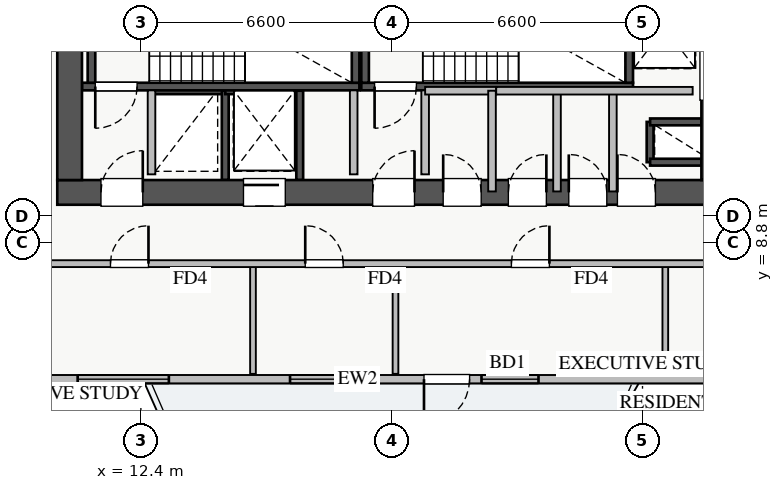
"""IFC4 building model, lengths in metres.
Left out: names, types, materials, properties, quantities, classifications, styles, units other than length and angle.
Written with IfcOpenShell. Run it as: python <this file> out.ifc"""

import sys

from ifc_helpers import new_model, si_unit, direction, frame, frame_2d, origin, place, context, subcontext, project, spatial, rectangle, extrude, source, transform, mapped, element, fill, save


model = new_model("IFC4")
c1 = context("Model", 3, precision=1e-05, world=origin(), true_north=direction((0.0, 1.0)))
c2 = subcontext(c1, "Body", "Model", "MODEL_VIEW")
j1 = project(units=[si_unit("LENGTHUNIT", "METRE"), si_unit("PLANEANGLEUNIT", "RADIAN")], contexts=[c1])
p1 = place(None, origin())
s1 = spatial("IfcSite", under=j1, at=p1, CompositionType="ELEMENT")
p2 = place(p1, origin())
s2 = spatial("IfcBuilding", under=s1, at=p2, CompositionType="ELEMENT")
p3 = place(p2, frame((0.0, 0.0, 113.25)))
s3 = spatial("IfcBuildingStorey", under=s2, at=p3, CompositionType="ELEMENT", Elevation=113.25)
p4 = place(p3, frame((12.68, 12.8, 0.0), z_axis=(0.0, 0.0, 1.0), x_axis=(1.0, 0.0, 0.0)))
e1 = element("IfcWall", 1, at=p4, inside=s3, PredefinedType="SHEAR", context=c2, shape_type="SweptSolid", body=[
    extrude(rectangle(XDim=1.94, YDim=0.18, at=frame_2d((0.97, 0.0))), origin(), (0.0, 0.0, 1.0), 3.07),
])
p5 = place(p3, frame((14.62, 10.45, 0.0), z_axis=(0.0, 0.0, 1.0), x_axis=(0.0, 1.0, 0.0)))
e2 = element("IfcWall", 2, at=p5, inside=s3, PredefinedType="SHEAR", context=c2, shape_type="SweptSolid", body=[
    extrude(rectangle(XDim=2.35, YDim=0.18, at=frame_2d((1.175, 0.0))), origin(), (0.0, 0.0, 1.0), 3.07),
])
p6 = place(p3, frame((25.8, 10.92, 0.0), z_axis=(0.0, 0.0, 1.0), x_axis=(0.0, 1.0, 0.0)))
e3 = element("IfcWall", 3, at=p6, inside=s3, PredefinedType="SHEAR", context=c2, shape_type="SweptSolid", body=[
    extrude(rectangle(XDim=1.06, YDim=0.18, at=frame_2d((0.53, 0.0))), origin(), (0.0, 0.0, 1.0), 3.07),
])
for number, where, z_axis, x_axis in (
    (4, (25.8, 11.98, 0.0), (0.0, 0.0, 1.0), (1.0, 0.0, 0.0)),
    (5, (25.8, 10.92, 0.0), (0.0, 0.0, 1.0), (1.0, 0.0, 0.0)),
):
    element("IfcWall", number, at=place(p3, frame(where, z_axis=z_axis, x_axis=x_axis)), inside=s3, PredefinedType="SHEAR", context=c2, shape_type="SweptSolid", body=[
        extrude(rectangle(XDim=1.35, YDim=0.18, at=frame_2d((0.675, 0.0))), origin(), (0.0, 0.0, 1.0), 3.07),
    ])
p7 = place(p3, frame((14.62, 12.8, 0.0), z_axis=(0.0, 0.0, 1.0), x_axis=(1.0, 0.0, 0.0)))
e6 = element("IfcWall", 6, at=p7, inside=s3, PredefinedType="SHEAR", context=c2, shape_type="SweptSolid", body=[
    extrude(rectangle(XDim=1.96, YDim=0.18, at=frame_2d((0.98, 0.0))), origin(), (0.0, 0.0, 1.0), 3.07),
])
p8 = place(p3, frame((16.58, 10.45, 0.0), z_axis=(0.0, 0.0, 1.0), x_axis=(0.0, 1.0, 0.0)))
e7 = element("IfcWall", 7, at=p8, inside=s3, PredefinedType="SHEAR", context=c2, shape_type="SweptSolid", body=[
    extrude(rectangle(XDim=2.35, YDim=0.18, at=frame_2d((1.175, 0.0))), origin(), (0.0, 0.0, 1.0), 3.07),
])
p9 = place(p3, frame((10.85, 12.91, 0.0), z_axis=(0.0, 0.0, 1.0), x_axis=(1.0, 0.0, 0.0)))
e8 = element("IfcWall", 8, at=p9, inside=s3, PredefinedType="SHEAR", context=c2, shape_type="SweptSolid", body=[
    extrude(rectangle(XDim=7.3, YDim=0.2, at=frame_2d((3.65, 0.0))), origin(), (0.0, 0.0, 1.0), 3.25),
])
p10 = place(p9, frame((0.35, 0.0, 0.0)))
e9 = element("IfcOpeningElement", 9, at=p10, cuts=e8, PredefinedType="OPENING", context=c2, shape_type="SweptSolid", body=[
    extrude(rectangle(XDim=1.1, YDim=2.05, at=frame_2d((0.55, 1.025))), frame((0.0, 0.11, 0.0), z_axis=(0.0, -1.0, 0.0), x_axis=(1.0, 0.0, 0.0)), (0.0, 0.0, 1.0), 0.22),
])
for number, where, z_axis, x_axis in (
    (10, (11.1, 13.01, 0.0), (0.0, 0.0, 1.0), (0.0, 1.0, 0.0)),
    (11, (18.05, 13.01, 0.0), (0.0, 0.0, 1.0), (0.0, 1.0, 0.0)),
):
    element("IfcWall", number, at=place(p3, frame(where, z_axis=z_axis, x_axis=x_axis)), inside=s3, PredefinedType="SHEAR", context=c2, shape_type="SweptSolid", body=[
        extrude(rectangle(XDim=2.94, YDim=0.2, at=frame_2d((1.47, 0.0))), origin(), (0.0, 0.0, 1.0), 3.25),
    ])
p11 = place(p3, frame((18.2, 12.91, 0.0), z_axis=(0.0, 0.0, 1.0), x_axis=(1.0, 0.0, 0.0)))
e12 = element("IfcWall", 12, at=p11, inside=s3, PredefinedType="SHEAR", context=c2, shape_type="SweptSolid", body=[
    extrude(rectangle(XDim=7.15, YDim=0.2, at=frame_2d((3.575, 0.0))), origin(), (0.0, 0.0, 1.0), 3.25),
])
p12 = place(p11, frame((0.35, 0.0, 0.0)))
e13 = element("IfcOpeningElement", 13, at=p12, cuts=e12, PredefinedType="OPENING", context=c2, shape_type="SweptSolid", body=[
    extrude(rectangle(XDim=1.1, YDim=2.05, at=frame_2d((0.55, 1.025))), frame((0.0, 0.11, 0.0), z_axis=(0.0, -1.0, 0.0), x_axis=(1.0, 0.0, 0.0)), (0.0, 0.0, 1.0), 0.22),
])
for number, where, z_axis, x_axis in (
    (14, (18.3, 13.01, 0.0), (0.0, 0.0, 1.0), (0.0, 1.0, 0.0)),
    (15, (25.25, 13.01, 0.0), (0.0, 0.0, 1.0), (0.0, 1.0, 0.0)),
):
    element("IfcWall", number, at=place(p3, frame(where, z_axis=z_axis, x_axis=x_axis)), inside=s3, PredefinedType="SHEAR", context=c2, shape_type="SweptSolid", body=[
        extrude(rectangle(XDim=2.94, YDim=0.2, at=frame_2d((1.47, 0.0))), origin(), (0.0, 0.0, 1.0), 3.25),
    ])
p13 = place(p3, frame((10.2, 10.125, 0.0), z_axis=(0.0, 0.0, 1.0), x_axis=(1.0, 0.0, 0.0)))
e16 = element("IfcWall", 16, at=p13, inside=s3, PredefinedType="SHEAR", context=c2, shape_type="SweptSolid", body=[
    extrude(rectangle(XDim=17.6, YDim=0.65, at=frame_2d((8.8, 0.0))), origin(), (0.0, 0.0, 1.0), 3.25),
])
p14 = place(p13, frame((1.15, 0.0, 0.0)))
e17 = element("IfcOpeningElement", 17, at=p14, cuts=e16, PredefinedType="OPENING", context=c2, shape_type="SweptSolid", body=[
    extrude(rectangle(XDim=1.1, YDim=2.05, at=frame_2d((0.55, 1.025))), frame((0.0, 0.335, 0.0), z_axis=(0.0, -1.0, 0.0), x_axis=(1.0, 0.0, 0.0)), (0.0, 0.0, 1.0), 0.67),
])
p15 = place(p13, frame((8.3, 0.0, 0.0)))
e18 = element("IfcOpeningElement", 18, at=p15, cuts=e16, PredefinedType="OPENING", context=c2, shape_type="SweptSolid", body=[
    extrude(rectangle(XDim=1.1, YDim=2.05, at=frame_2d((0.55, 1.025))), frame((0.0, 0.335, 0.0), z_axis=(0.0, -1.0, 0.0), x_axis=(1.0, 0.0, 0.0)), (0.0, 0.0, 1.0), 0.67),
])
p16 = place(p13, frame((4.9, 0.0, 0.0)))
e19 = element("IfcOpeningElement", 19, at=p16, cuts=e16, PredefinedType="OPENING", context=c2, shape_type="SweptSolid", body=[
    extrude(rectangle(XDim=1.1, YDim=2.05, at=frame_2d((0.55, 1.025))), frame((0.0, 0.335, 0.0), z_axis=(0.0, -1.0, 0.0), x_axis=(1.0, 0.0, 0.0)), (0.0, 0.0, 1.0), 0.67),
])
p17 = place(p13, frame((14.74, 0.0, 0.0)))
e20 = element("IfcOpeningElement", 20, at=p17, cuts=e16, PredefinedType="OPENING", context=c2, shape_type="SweptSolid", body=[
    extrude(rectangle(XDim=1.0, YDim=2.05, at=frame_2d((0.5, 1.025))), frame((0.0, 0.335, 0.0), z_axis=(0.0, -1.0, 0.0), x_axis=(1.0, 0.0, 0.0)), (0.0, 0.0, 1.0), 0.67),
])
p18 = place(p13, frame((10.155, 0.0, 0.0)))
e21 = element("IfcOpeningElement", 21, at=p18, cuts=e16, PredefinedType="OPENING", context=c2, shape_type="SweptSolid", body=[
    extrude(rectangle(XDim=1.0, YDim=2.05, at=frame_2d((0.5, 1.025))), frame((0.0, 0.335, 0.0), z_axis=(0.0, -1.0, 0.0), x_axis=(1.0, 0.0, 0.0)), (0.0, 0.0, 1.0), 0.67),
])
p19 = place(p13, frame((11.87, 0.0, 0.0)))
e22 = element("IfcOpeningElement", 22, at=p19, cuts=e16, PredefinedType="OPENING", context=c2, shape_type="SweptSolid", body=[
    extrude(rectangle(XDim=1.0, YDim=2.05, at=frame_2d((0.5, 1.025))), frame((0.0, 0.335, 0.0), z_axis=(0.0, -1.0, 0.0), x_axis=(1.0, 0.0, 0.0)), (0.0, 0.0, 1.0), 0.67),
])
p20 = place(p13, frame((13.46, 0.0, 0.0)))
e23 = element("IfcOpeningElement", 23, at=p20, cuts=e16, PredefinedType="OPENING", context=c2, shape_type="SweptSolid", body=[
    extrude(rectangle(XDim=1.0, YDim=2.05, at=frame_2d((0.5, 1.025))), frame((0.0, 0.335, 0.0), z_axis=(0.0, -1.0, 0.0), x_axis=(1.0, 0.0, 0.0)), (0.0, 0.0, 1.0), 0.67),
])
p21 = place(p3, frame((10.525, 10.45, 0.0), z_axis=(0.0, 0.0, 1.0), x_axis=(0.0, 1.0, 0.0)))
e24 = element("IfcWall", 24, at=p21, inside=s3, PredefinedType="SHEAR", context=c2, shape_type="SweptSolid", body=[
    extrude(rectangle(XDim=5.9, YDim=0.65, at=frame_2d((2.95, 0.0))), origin(), (0.0, 0.0, 1.0), 3.25),
])
p22 = place(p3, frame((27.475, 10.45, 0.0), z_axis=(0.0, 0.0, 1.0), x_axis=(0.0, 1.0, 0.0)))
e25 = element("IfcWall", 25, at=p22, inside=s3, PredefinedType="SHEAR", context=c2, shape_type="SweptSolid", body=[
    extrude(rectangle(XDim=5.9, YDim=0.65, at=frame_2d((2.95, 0.0))), origin(), (0.0, 0.0, 1.0), 3.25),
])
p23 = place(p22, frame((2.1, 0.0, 0.0)))
e26 = element("IfcOpeningElement", 26, at=p23, cuts=e25, PredefinedType="OPENING", context=c2, shape_type="SweptSolid", body=[
    extrude(rectangle(XDim=1.3, YDim=2.05, at=frame_2d((0.65, 1.025))), frame((0.0, 0.335, 0.0), z_axis=(0.0, -1.0, 0.0), x_axis=(1.0, 0.0, 0.0)), (0.0, 0.0, 1.0), 0.67),
])
p24 = place(p3, frame((6.55, 5.21, 0.0), z_axis=(0.0, 0.0, 1.0), x_axis=(1.0, 0.0, 0.0)))
e27 = element("IfcWall", 27, at=p24, inside=s3, PredefinedType="STANDARD", context=c2, shape_type="SweptSolid", body=[
    extrude(rectangle(XDim=24.9, YDim=0.22, at=frame_2d((12.45, 0.0))), origin(), (0.0, 0.0, 1.0), 2.61),
])
p25 = place(p24, frame((13.3, 0.0, 0.0)))
e28 = element("IfcOpeningElement", 28, at=p25, cuts=e27, PredefinedType="OPENING", context=c2, shape_type="SweptSolid", body=[
    extrude(rectangle(XDim=1.2, YDim=2.1, at=frame_2d((0.6, 1.05))), frame((0.0, 0.12, 0.0), z_axis=(0.0, -1.0, 0.0), x_axis=(1.0, 0.0, 0.0)), (0.0, 0.0, 1.0), 0.24),
])
p26 = place(p24, frame((0.258, 0.0, 0.9)))
e29 = element("IfcOpeningElement", 29, at=p26, cuts=e27, PredefinedType="OPENING", context=c2, shape_type="SweptSolid", body=[
    extrude(rectangle(XDim=1.8, YDim=1.5, at=frame_2d((0.9, 0.75))), frame((0.0, 0.12, 0.0), z_axis=(0.0, -1.0, 0.0), x_axis=(1.0, 0.0, 0.0)), (0.0, 0.0, 1.0), 0.24),
])
p27 = place(p24, frame((9.775, 0.0, 0.9)))
e30 = element("IfcOpeningElement", 30, at=p27, cuts=e27, PredefinedType="OPENING", context=c2, shape_type="SweptSolid", body=[
    extrude(rectangle(XDim=1.8, YDim=1.5, at=frame_2d((0.9, 0.75))), frame((0.0, 0.12, 0.0), z_axis=(0.0, -1.0, 0.0), x_axis=(1.0, 0.0, 0.0)), (0.0, 0.0, 1.0), 0.24),
])
p28 = place(p24, frame((14.813, 0.0, 0.9)))
e31 = element("IfcOpeningElement", 31, at=p28, cuts=e27, PredefinedType="OPENING", context=c2, shape_type="SweptSolid", body=[
    extrude(rectangle(XDim=1.5, YDim=1.45, at=frame_2d((0.75, 0.725))), frame((0.0, 0.12, 0.0), z_axis=(0.0, -1.0, 0.0), x_axis=(1.0, 0.0, 0.0)), (0.0, 0.0, 1.0), 0.24),
])
p29 = place(p24, frame((20.738, 0.0, 0.9)))
e32 = element("IfcOpeningElement", 32, at=p29, cuts=e27, PredefinedType="OPENING", context=c2, shape_type="SweptSolid", body=[
    extrude(rectangle(XDim=2.1, YDim=1.48, at=frame_2d((1.05, 0.74))), frame((0.0, 0.12, 0.0), z_axis=(0.0, -1.0, 0.0), x_axis=(1.0, 0.0, 0.0)), (0.0, 0.0, 1.0), 0.24),
])
p30 = place(p24, frame((4.187, 0.0, 0.9)))
e33 = element("IfcOpeningElement", 33, at=p30, cuts=e27, PredefinedType="OPENING", context=c2, shape_type="SweptSolid", body=[
    extrude(rectangle(XDim=2.4, YDim=1.5, at=frame_2d((1.2, 0.75))), frame((0.0, 0.12, 0.0), z_axis=(0.0, -1.0, 0.0), x_axis=(1.0, 0.0, 0.0)), (0.0, 0.0, 1.0), 0.24),
])
for number, where, z_axis, x_axis in (
    (34, (12.68, 10.6, 0.0), (0.0, 0.0, 1.0), (0.0, 1.0, 0.0)),
    (35, (18.0, 10.6, 0.0), (0.0, 0.0, 1.0), (0.0, 1.0, 0.0)),
    (36, (19.88, 10.6, 0.0), (0.0, 0.0, 1.0), (0.0, 1.0, 0.0)),
):
    element("IfcWall", number, at=place(p3, frame(where, z_axis=z_axis, x_axis=x_axis)), inside=s3, PredefinedType="PARTITIONING", context=c2, shape_type="SweptSolid", body=[
        extrude(rectangle(XDim=2.21, YDim=0.2, at=frame_2d((1.105, 0.0))), origin(), (0.0, 0.0, 1.0), 3.07),
    ])
p31 = place(p3, frame((24.82, 10.15, 0.0), z_axis=(0.0, 0.0, 1.0), x_axis=(0.0, 1.0, 0.0)))
e37 = element("IfcWall", 37, at=p31, inside=s3, PredefinedType="PARTITIONING", context=c2, shape_type="SweptSolid", body=[
    extrude(rectangle(XDim=2.65, YDim=0.2, at=frame_2d((1.325, 0.0))), origin(), (0.0, 0.0, 1.0), 3.07),
])
p32 = place(p3, frame((19.88, 12.8, 0.0), z_axis=(0.0, 0.0, 1.0), x_axis=(1.0, 0.0, 0.0)))
e38 = element("IfcWall", 38, at=p32, inside=s3, PredefinedType="PARTITIONING", context=c2, shape_type="SweptSolid", body=[
    extrude(rectangle(XDim=1.87, YDim=0.2, at=frame_2d((0.935, 0.0))), origin(), (0.0, 0.0, 1.0), 3.07),
])
for number, where, z_axis, x_axis in (
    (39, (21.64, 10.15, 0.0), (0.0, 0.0, 1.0), (0.0, 1.0, 0.0)),
    (40, (23.35, 10.15, 0.0), (0.0, 0.0, 1.0), (0.0, 1.0, 0.0)),
):
    element("IfcWall", number, at=place(p3, frame(where, z_axis=z_axis, x_axis=x_axis)), inside=s3, PredefinedType="PARTITIONING", context=c2, shape_type="SweptSolid", body=[
        extrude(rectangle(XDim=2.65, YDim=0.2, at=frame_2d((1.325, 0.0))), origin(), (0.0, 0.0, 1.0), 3.07),
    ])
p33 = place(p3, frame((21.75, 12.8, 0.0), z_axis=(0.0, 0.0, 1.0), x_axis=(1.0, 0.0, 0.0)))
e41 = element("IfcWall", 41, at=p33, inside=s3, PredefinedType="PARTITIONING", context=c2, shape_type="SweptSolid", body=[
    extrude(rectangle(XDim=5.17, YDim=0.2, at=frame_2d((2.585, 0.0))), origin(), (0.0, 0.0, 1.0), 3.07),
])
p34 = place(p3, frame((15.35, 5.35, 0.0), z_axis=(0.0, 0.0, 1.0), x_axis=(0.0, 1.0, 0.0)))
e42 = element("IfcWall", 42, at=p34, inside=s3, PredefinedType="PARTITIONING", context=c2, shape_type="SweptSolid", body=[
    extrude(rectangle(XDim=2.9, YDim=0.15, at=frame_2d((1.45, 0.0))), origin(), (0.0, 0.0, 1.0), 3.07),
])
p35 = place(p3, frame((19.1, 5.35, 0.0), z_axis=(0.0, 0.0, 1.0), x_axis=(0.0, 1.0, 0.0)))
e43 = element("IfcWall", 43, at=p35, inside=s3, PredefinedType="PARTITIONING", context=c2, shape_type="SweptSolid", body=[
    extrude(rectangle(XDim=2.9, YDim=0.15, at=frame_2d((1.45, 0.0))), origin(), (0.0, 0.0, 1.0), 2.771),
])
p36 = place(p3, frame((26.2, 5.35, 0.0), z_axis=(0.0, 0.0, 1.0), x_axis=(0.0, 1.0, 0.0)))
e44 = element("IfcWall", 44, at=p36, inside=s3, PredefinedType="PARTITIONING", context=c2, shape_type="SweptSolid", body=[
    extrude(rectangle(XDim=2.9, YDim=0.15, at=frame_2d((1.45, 0.0))), origin(), (0.0, 0.0, 1.0), 3.07),
])
p37 = place(p3, frame((8.85, 8.25, 0.0), z_axis=(0.0, 0.0, 1.0), x_axis=(1.0, 0.0, 0.0)))
e45 = element("IfcWall", 45, at=p37, inside=s3, PredefinedType="PARTITIONING", context=c2, shape_type="SweptSolid", body=[
    extrude(rectangle(XDim=23.57, YDim=0.18, at=frame_2d((11.785, 0.0))), origin(), (0.0, 0.0, 1.0), 3.07),
])
p38 = place(p37, frame((2.75, 0.0, 0.0)))
e46 = element("IfcOpeningElement", 46, at=p38, cuts=e45, PredefinedType="OPENING", context=c2, shape_type="SweptSolid", body=[
    extrude(rectangle(XDim=1.0, YDim=2.05, at=frame_2d((0.5, 1.025))), frame((0.0, 0.1, 0.0), z_axis=(0.0, -1.0, 0.0), x_axis=(1.0, 0.0, 0.0)), (0.0, 0.0, 1.0), 0.2),
])
p39 = place(p37, frame((7.875, 0.0, 0.0)))
e47 = element("IfcOpeningElement", 47, at=p39, cuts=e45, PredefinedType="OPENING", context=c2, shape_type="SweptSolid", body=[
    extrude(rectangle(XDim=1.0, YDim=2.05, at=frame_2d((0.5, 1.025))), frame((0.0, 0.1, 0.0), z_axis=(0.0, -1.0, 0.0), x_axis=(1.0, 0.0, 0.0)), (0.0, 0.0, 1.0), 0.2),
])
p40 = place(p37, frame((13.3, 0.0, 0.0)))
e48 = element("IfcOpeningElement", 48, at=p40, cuts=e45, PredefinedType="OPENING", context=c2, shape_type="SweptSolid", body=[
    extrude(rectangle(XDim=1.0, YDim=2.05, at=frame_2d((0.5, 1.025))), frame((0.0, 0.1, 0.0), z_axis=(0.0, -1.0, 0.0), x_axis=(1.0, 0.0, 0.0)), (0.0, 0.0, 1.0), 0.2),
])
p41 = place(p37, frame((19.74, 0.0, 0.0)))
e49 = element("IfcOpeningElement", 49, at=p41, cuts=e45, PredefinedType="OPENING", context=c2, shape_type="SweptSolid", body=[
    extrude(rectangle(XDim=1.0, YDim=2.05, at=frame_2d((0.5, 1.025))), frame((0.0, 0.1, 0.0), z_axis=(0.0, -1.0, 0.0), x_axis=(1.0, 0.0, 0.0)), (0.0, 0.0, 1.0), 0.2),
])
m1 = source(origin(), c2, "Body", "SweptSolid", [
    extrude(rectangle(XDim=1.2, YDim=2.1, at=frame_2d((0.6, 1.05))), frame((0.0, 0.025, 0.0), z_axis=(0.0, -1.0, 0.0), x_axis=(1.0, 0.0, 0.0)), (0.0, 0.0, 1.0), 0.05),
])
p42 = place(p25, frame((1.2, 0.0, 0.0), z_axis=(0.0, 0.0, 1.0), x_axis=(-1.0, 0.0, 0.0)))
e50 = element("IfcDoor", 50, at=p42, inside=s3, OperationType="SINGLE_SWING_LEFT", PredefinedType="DOOR", context=c2, shape_type="MappedRepresentation", body=[
    mapped(m1, transform((0.0, 0.0, 0.0), x_axis=(1.0, 0.0, 0.0), y_axis=(0.0, 1.0, 0.0), z_axis=(0.0, 0.0, 1.0), scale=1.0)),
])
fill(e28, e50)
m2 = source(origin(), c2, "Body", "SweptSolid", [
    extrude(rectangle(XDim=1.8, YDim=1.5, at=frame_2d((0.9, 0.75))), frame((0.0, 0.03, 0.0), z_axis=(0.0, -1.0, 0.0), x_axis=(1.0, 0.0, 0.0)), (0.0, 0.0, 1.0), 0.06),
])
p43 = place(p27, origin())
e51 = element("IfcWindow", 51, at=p43, inside=s3, PartitioningType="DOUBLE_PANEL_VERTICAL", PredefinedType="WINDOW", context=c2, shape_type="MappedRepresentation", body=[
    mapped(m2, transform((0.0, 0.0, 0.0), x_axis=(1.0, 0.0, 0.0), y_axis=(0.0, 1.0, 0.0), z_axis=(0.0, 0.0, 1.0), scale=1.0)),
])
fill(e30, e51)
m3 = source(origin(), c2, "Body", "SweptSolid", [
    extrude(rectangle(XDim=1.5, YDim=1.45, at=frame_2d((0.75, 0.725))), frame((0.0, 0.03, 0.0), z_axis=(0.0, -1.0, 0.0), x_axis=(1.0, 0.0, 0.0)), (0.0, 0.0, 1.0), 0.06),
])
p44 = place(p28, origin())
e52 = element("IfcWindow", 52, at=p44, inside=s3, PartitioningType="DOUBLE_PANEL_VERTICAL", PredefinedType="WINDOW", context=c2, shape_type="MappedRepresentation", body=[
    mapped(m3, transform((0.0, 0.0, 0.0), x_axis=(1.0, 0.0, 0.0), y_axis=(0.0, 1.0, 0.0), z_axis=(0.0, 0.0, 1.0), scale=1.0)),
])
fill(e31, e52)
m4 = source(origin(), c2, "Body", "SweptSolid", [
    extrude(rectangle(XDim=1.1, YDim=2.05, at=frame_2d((0.55, 1.025))), frame((0.0, 0.025, 0.0), z_axis=(0.0, -1.0, 0.0), x_axis=(1.0, 0.0, 0.0)), (0.0, 0.0, 1.0), 0.05),
])
p45 = place(p14, origin())
e53 = element("IfcDoor", 53, at=p45, inside=s3, OperationType="SINGLE_SWING_RIGHT", PredefinedType="DOOR", context=c2, shape_type="MappedRepresentation", body=[
    mapped(m4, transform((0.0, 0.0, 0.0), x_axis=(1.0, 0.0, 0.0), y_axis=(0.0, 1.0, 0.0), z_axis=(0.0, 0.0, 1.0), scale=1.0)),
])
fill(e17, e53)
p46 = place(p10, frame((1.1, 0.0, 0.0), z_axis=(0.0, 0.0, 1.0), x_axis=(-1.0, 0.0, 0.0)))
e54 = element("IfcDoor", 54, at=p46, inside=s3, OperationType="SINGLE_SWING_LEFT", PredefinedType="DOOR", context=c2, shape_type="MappedRepresentation", body=[
    mapped(m4, transform((0.0, 0.0, 0.0), x_axis=(1.0, 0.0, 0.0), y_axis=(0.0, 1.0, 0.0), z_axis=(0.0, 0.0, 1.0), scale=1.0)),
])
fill(e9, e54)
p47 = place(p15, origin())
e55 = element("IfcDoor", 55, at=p47, inside=s3, OperationType="SINGLE_SWING_RIGHT", PredefinedType="DOOR", context=c2, shape_type="MappedRepresentation", body=[
    mapped(m4, transform((0.0, 0.0, 0.0), x_axis=(1.0, 0.0, 0.0), y_axis=(0.0, 1.0, 0.0), z_axis=(0.0, 0.0, 1.0), scale=1.0)),
])
fill(e18, e55)
p48 = place(p12, frame((1.1, 0.0, 0.0), z_axis=(0.0, 0.0, 1.0), x_axis=(-1.0, 0.0, 0.0)))
e56 = element("IfcDoor", 56, at=p48, inside=s3, OperationType="SINGLE_SWING_LEFT", PredefinedType="DOOR", context=c2, shape_type="MappedRepresentation", body=[
    mapped(m4, transform((0.0, 0.0, 0.0), x_axis=(1.0, 0.0, 0.0), y_axis=(0.0, 1.0, 0.0), z_axis=(0.0, 0.0, 1.0), scale=1.0)),
])
fill(e13, e56)
p49 = place(p16, origin())
e57 = element("IfcDoor", 57, at=p49, inside=s3, OperationType="SLIDING_TO_RIGHT", PredefinedType="DOOR", context=c2, shape_type="MappedRepresentation", body=[
    mapped(m4, transform((0.0, 0.0, 0.0), x_axis=(1.0, 0.0, 0.0), y_axis=(0.0, 1.0, 0.0), z_axis=(0.0, 0.0, 1.0), scale=1.0)),
])
fill(e19, e57)
m5 = source(origin(), c2, "Body", "SweptSolid", [
    extrude(rectangle(XDim=1.0, YDim=2.05, at=frame_2d((0.5, 1.025))), frame((0.0, 0.025, 0.0), z_axis=(0.0, -1.0, 0.0), x_axis=(1.0, 0.0, 0.0)), (0.0, 0.0, 1.0), 0.05),
])
p50 = place(p17, origin())
e58 = element("IfcDoor", 58, at=p50, inside=s3, OperationType="SINGLE_SWING_LEFT", PredefinedType="DOOR", context=c2, shape_type="MappedRepresentation", body=[
    mapped(m5, transform((0.0, 0.0, 0.0), x_axis=(1.0, 0.0, 0.0), y_axis=(0.0, 1.0, 0.0), z_axis=(0.0, 0.0, 1.0), scale=1.0)),
])
fill(e20, e58)
p51 = place(p18, origin())
e59 = element("IfcDoor", 59, at=p51, inside=s3, OperationType="SINGLE_SWING_LEFT", PredefinedType="DOOR", context=c2, shape_type="MappedRepresentation", body=[
    mapped(m5, transform((0.0, 0.0, 0.0), x_axis=(1.0, 0.0, 0.0), y_axis=(0.0, 1.0, 0.0), z_axis=(0.0, 0.0, 1.0), scale=1.0)),
])
fill(e21, e59)
p52 = place(p19, origin())
e60 = element("IfcDoor", 60, at=p52, inside=s3, OperationType="SINGLE_SWING_RIGHT", PredefinedType="DOOR", context=c2, shape_type="MappedRepresentation", body=[
    mapped(m5, transform((0.0, 0.0, 0.0), x_axis=(1.0, 0.0, 0.0), y_axis=(0.0, 1.0, 0.0), z_axis=(0.0, 0.0, 1.0), scale=1.0)),
])
fill(e22, e60)
p53 = place(p20, origin())
e61 = element("IfcDoor", 61, at=p53, inside=s3, OperationType="SINGLE_SWING_LEFT", PredefinedType="DOOR", context=c2, shape_type="MappedRepresentation", body=[
    mapped(m5, transform((0.0, 0.0, 0.0), x_axis=(1.0, 0.0, 0.0), y_axis=(0.0, 1.0, 0.0), z_axis=(0.0, 0.0, 1.0), scale=1.0)),
])
fill(e23, e61)
p54 = place(p38, origin())
e62 = element("IfcDoor", 62, at=p54, inside=s3, OperationType="SINGLE_SWING_RIGHT", PredefinedType="DOOR", context=c2, shape_type="MappedRepresentation", body=[
    mapped(m5, transform((0.0, 0.0, 0.0), x_axis=(1.0, 0.0, 0.0), y_axis=(0.0, 1.0, 0.0), z_axis=(0.0, 0.0, 1.0), scale=1.0)),
])
fill(e46, e62)
p55 = place(p39, origin())
e63 = element("IfcDoor", 63, at=p55, inside=s3, OperationType="SINGLE_SWING_LEFT", PredefinedType="DOOR", context=c2, shape_type="MappedRepresentation", body=[
    mapped(m5, transform((0.0, 0.0, 0.0), x_axis=(1.0, 0.0, 0.0), y_axis=(0.0, 1.0, 0.0), z_axis=(0.0, 0.0, 1.0), scale=1.0)),
])
fill(e47, e63)
p56 = place(p40, origin())
e64 = element("IfcDoor", 64, at=p56, inside=s3, OperationType="SINGLE_SWING_RIGHT", PredefinedType="DOOR", context=c2, shape_type="MappedRepresentation", body=[
    mapped(m5, transform((0.0, 0.0, 0.0), x_axis=(1.0, 0.0, 0.0), y_axis=(0.0, 1.0, 0.0), z_axis=(0.0, 0.0, 1.0), scale=1.0)),
])
fill(e48, e64)
m6 = source(origin(), c2, "Body", "SweptSolid", [
    extrude(rectangle(XDim=2.4, YDim=1.5, at=frame_2d((1.2, 0.75))), frame((0.0, 0.03, 0.0), z_axis=(0.0, -1.0, 0.0), x_axis=(1.0, 0.0, 0.0)), (0.0, 0.0, 1.0), 0.06),
])
p57 = place(p30, origin())
e65 = element("IfcWindow", 65, at=p57, inside=s3, PartitioningType="TRIPLE_PANEL_VERTICAL", PredefinedType="WINDOW", context=c2, shape_type="MappedRepresentation", body=[
    mapped(m6, transform((0.0, 0.0, 0.0), x_axis=(1.0, 0.0, 0.0), y_axis=(0.0, 1.0, 0.0), z_axis=(0.0, 0.0, 1.0), scale=1.0)),
])
fill(e33, e65)
save(model, sys.argv[1])
